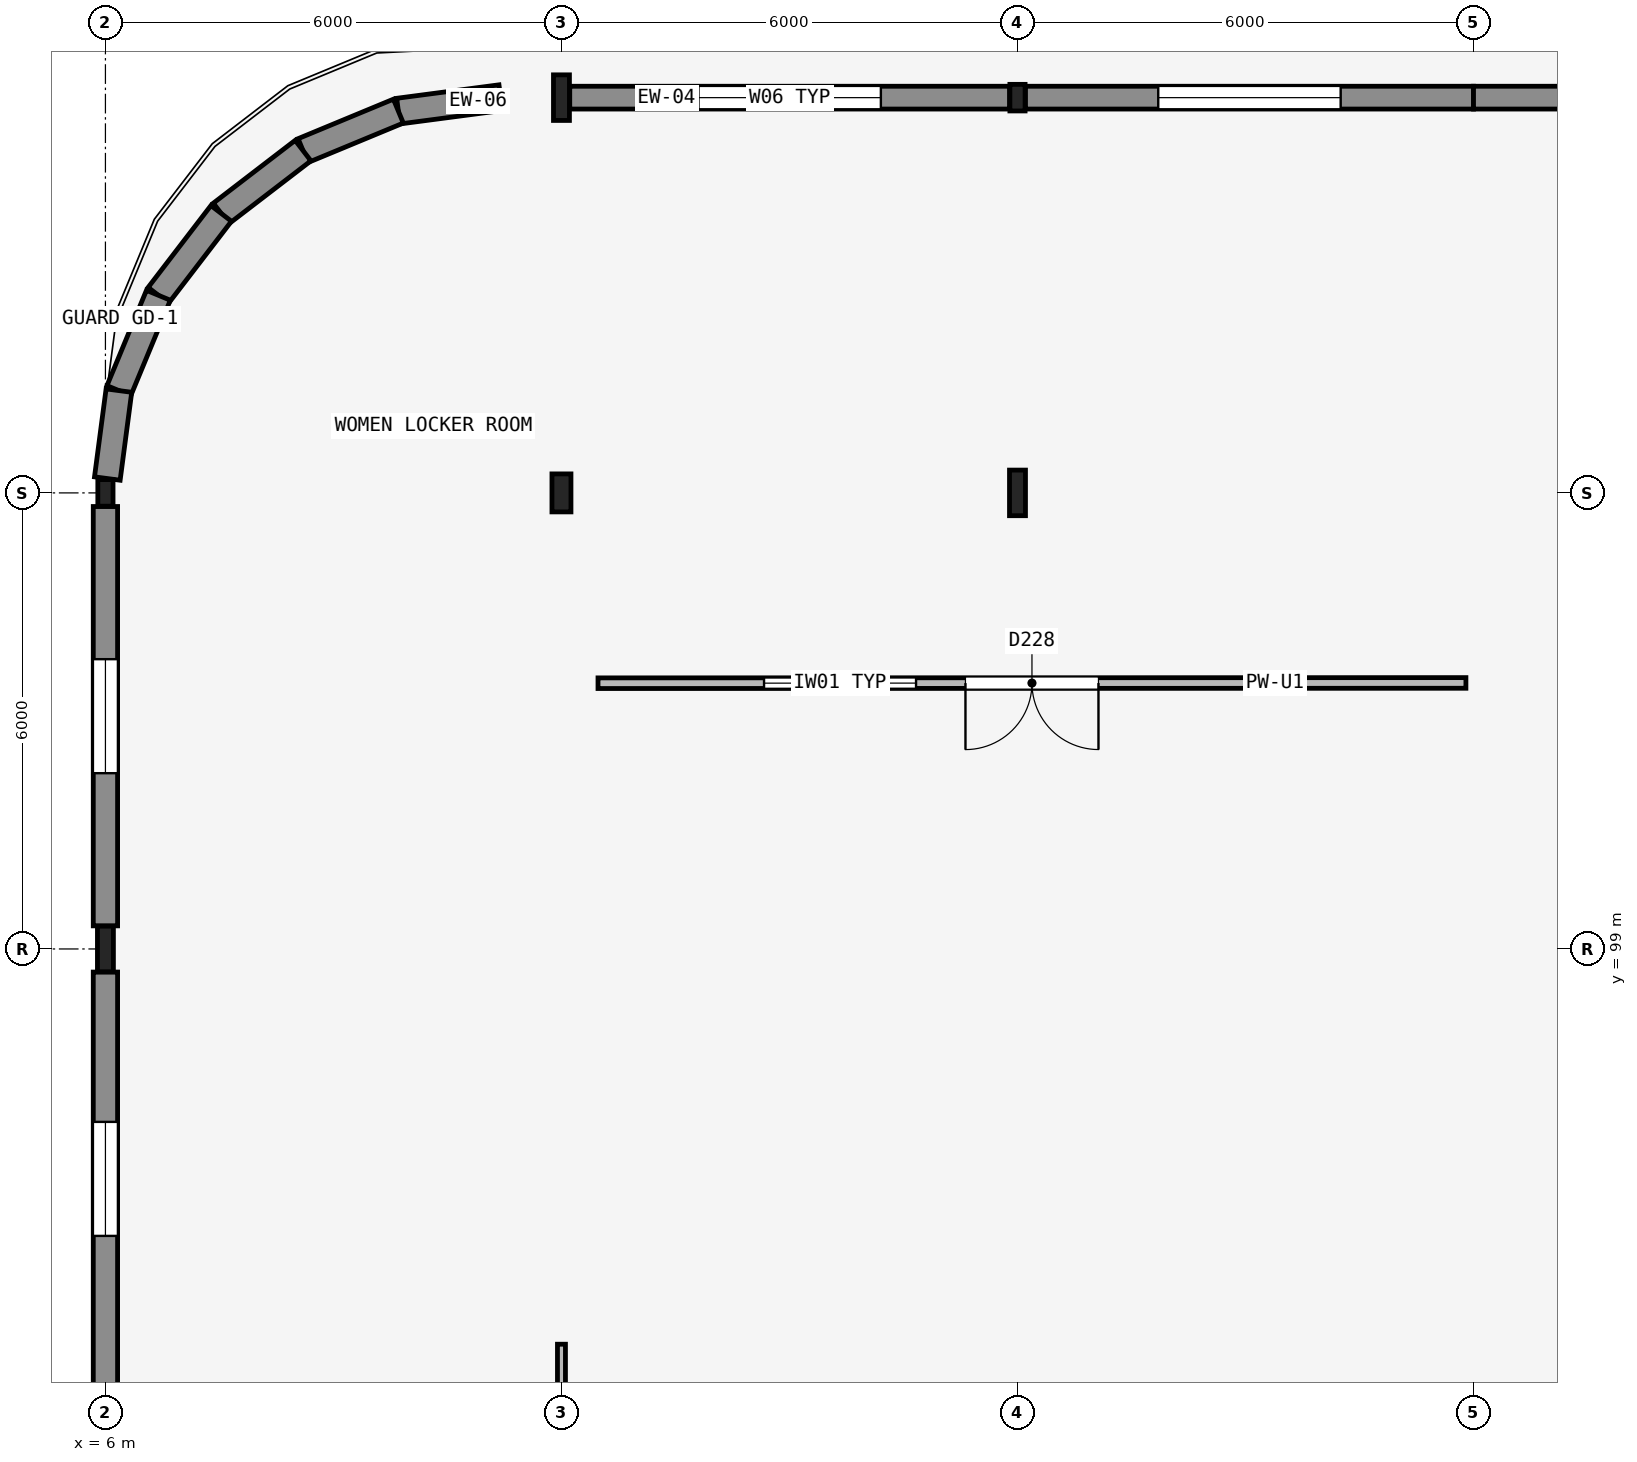
"""IFC4 building model, lengths in metres.
Left out: names, types, materials, properties, quantities, classifications, styles, units other than length and angle.
Written with IfcOpenShell. Run it as: python <this file> out.ifc"""

import sys

from ifc_helpers import new_model, si_unit, direction, frame, frame_2d, origin, origin_2d, place, context, subcontext, project, spatial, rectangle, hollow_rectangle, i_section, extrude, element, fill, save


model = new_model("IFC4")
c1 = context("Model", 3, precision=1e-05, world=origin(), true_north=direction((0.0, 1.0)))
c2 = subcontext(c1, "Body", "Model", "MODEL_VIEW")
j1 = project(units=[si_unit("LENGTHUNIT", "METRE"), si_unit("PLANEANGLEUNIT", "RADIAN")], contexts=[c1])
p1 = place(None, origin())
s1 = spatial("IfcSite", under=j1, at=p1, CompositionType="ELEMENT")
p2 = place(p1, origin())
s2 = spatial("IfcBuilding", under=s1, at=p2, CompositionType="ELEMENT")
p3 = place(p2, frame((0.0, 0.0, 9.3)))
s3 = spatial("IfcBuildingStorey", under=s2, at=p3, CompositionType="ELEMENT", Elevation=9.3)
p4 = place(p3, frame((6.0, 99.0, 0.0), z_axis=(0.0, 0.0, 1.0), x_axis=(1.0, 0.0, 0.0)))
e1 = element("IfcColumn", 1, at=p4, inside=s3, PredefinedType="COLUMN", context=c2, shape_type="SweptSolid", body=[
    extrude(i_section(OverallWidth=0.21, OverallDepth=0.6, WebThickness=0.012, FlangeThickness=0.021, FilletRadius=0.02, at=origin_2d()), origin(), (0.0, 0.0, 1.0), 4.2),
])
p5 = place(p3, frame((6.0, 105.0, 0.0), z_axis=(0.0, 0.0, 1.0), x_axis=(1.0, 0.0, 0.0)))
e2 = element("IfcColumn", 2, at=p5, inside=s3, PredefinedType="COLUMN", context=c2, shape_type="SweptSolid", body=[
    extrude(hollow_rectangle(XDim=0.2, YDim=0.35, WallThickness=0.012, InnerFilletRadius=0.012, OuterFilletRadius=0.024, at=origin_2d()), origin(), (0.0, 0.0, 1.0), 4.2),
])
p6 = place(p3, frame((12.0, 105.0, 0.0), z_axis=(0.0, 0.0, 1.0), x_axis=(1.0, 0.0, 0.0)))
e3 = element("IfcColumn", 3, at=p6, inside=s3, PredefinedType="COLUMN", context=c2, shape_type="SweptSolid", body=[
    extrude(i_section(OverallWidth=0.25, OverallDepth=0.5, WebThickness=0.01, FlangeThickness=0.015, FilletRadius=0.015, at=origin_2d()), origin(), (0.0, 0.0, 1.0), 4.2),
])
for number, where, z_axis, x_axis in (
    (4, (12.0, 110.2, 0.0), (0.0, 0.0, 1.0), (1.0, 0.0, 0.0)),
    (5, (18.0, 105.0, 0.0), (0.0, 0.0, 1.0), (1.0, 0.0, 0.0)),
):
    element("IfcColumn", number, at=place(p3, frame(where, z_axis=z_axis, x_axis=x_axis)), inside=s3, PredefinedType="COLUMN", context=c2, shape_type="SweptSolid", body=[
        extrude(i_section(OverallWidth=0.21, OverallDepth=0.6, WebThickness=0.012, FlangeThickness=0.021, FilletRadius=0.02, at=origin_2d()), origin(), (0.0, 0.0, 1.0), 4.2),
    ])
p7 = place(p3, frame((18.0, 110.2, 0.0), z_axis=(0.0, 0.0, 1.0), x_axis=(1.0, 0.0, 0.0)))
e6 = element("IfcColumn", 6, at=p7, inside=s3, PredefinedType="COLUMN", context=c2, shape_type="SweptSolid", body=[
    extrude(hollow_rectangle(XDim=0.2, YDim=0.35, WallThickness=0.012, InnerFilletRadius=0.012, OuterFilletRadius=0.024, at=origin_2d()), origin(), (0.0, 0.0, 1.0), 4.2),
])
p8 = place(p3, frame((6.0, 93.254, 0.0), z_axis=(0.0, 0.0, 1.0), x_axis=(0.0, 1.0, 0.0)))
e7 = element("IfcWall", 7, at=p8, inside=s3, PredefinedType="SOLIDWALL", context=c2, shape_type="SweptSolid", body=[
    extrude(rectangle(XDim=5.442, YDim=0.32, at=frame_2d((2.721, 0.0))), origin(), (0.0, 0.0, 1.0), 3.484),
])
p9 = place(p8, frame((1.971, 0.0, 1.6)))
e8 = element("IfcOpeningElement", 8, at=p9, cuts=e7, PredefinedType="OPENING", context=c2, shape_type="SweptSolid", body=[
    extrude(rectangle(XDim=1.5, YDim=0.6, at=frame_2d((0.75, 0.3))), frame((0.0, 0.17, 0.0), z_axis=(0.0, -1.0, 0.0), x_axis=(1.0, 0.0, 0.0)), (0.0, 0.0, 1.0), 0.34),
])
p10 = place(p3, frame((6.0, 99.304, 0.0), z_axis=(0.0, 0.0, 1.0), x_axis=(0.0, 1.0, 0.0)))
e9 = element("IfcWall", 9, at=p10, inside=s3, PredefinedType="SOLIDWALL", context=c2, shape_type="SweptSolid", body=[
    extrude(rectangle(XDim=5.517, YDim=0.32, at=frame_2d((2.759, 0.0))), origin(), (0.0, 0.0, 1.0), 3.44),
])
p11 = place(p10, frame((2.009, 0.0, 1.6)))
e10 = element("IfcOpeningElement", 10, at=p11, cuts=e9, PredefinedType="OPENING", context=c2, shape_type="SweptSolid", body=[
    extrude(rectangle(XDim=1.5, YDim=0.6, at=frame_2d((0.75, 0.3))), frame((0.0, 0.17, 0.0), z_axis=(0.0, -1.0, 0.0), x_axis=(1.0, 0.0, 0.0)), (0.0, 0.0, 1.0), 0.34),
])
p12 = place(p3, frame((12.109, 110.2, 0.0), z_axis=(0.0, 0.0, 1.0), x_axis=(1.0, 0.0, 0.0)))
e11 = element("IfcWall", 11, at=p12, inside=s3, PredefinedType="SOLIDWALL", context=c2, shape_type="SweptSolid", body=[
    extrude(rectangle(XDim=5.787, YDim=0.3, at=frame_2d((2.894, 0.0))), origin(), (0.0, 0.0, 1.0), 3.09),
])
p13 = place(p12, frame((1.694, 0.0, 1.1)))
e12 = element("IfcOpeningElement", 12, at=p13, cuts=e11, PredefinedType="OPENING", context=c2, shape_type="SweptSolid", body=[
    extrude(rectangle(XDim=2.4, YDim=1.2, at=frame_2d((1.2, 0.6))), frame((0.0, 0.16, 0.0), z_axis=(0.0, -1.0, 0.0), x_axis=(1.0, 0.0, 0.0)), (0.0, 0.0, 1.0), 0.32),
])
p14 = place(p3, frame((18.104, 110.2, 0.0), z_axis=(0.0, 0.0, 1.0), x_axis=(1.0, 0.0, 0.0)))
e13 = element("IfcWall", 13, at=p14, inside=s3, PredefinedType="SOLIDWALL", context=c2, shape_type="SweptSolid", body=[
    extrude(rectangle(XDim=5.896, YDim=0.3, at=frame_2d((2.948, 0.0))), origin(), (0.0, 0.0, 1.0), 3.09),
])
p15 = place(p14, frame((1.748, 0.0, 1.1)))
e14 = element("IfcOpeningElement", 14, at=p15, cuts=e13, PredefinedType="OPENING", context=c2, shape_type="SweptSolid", body=[
    extrude(rectangle(XDim=2.4, YDim=1.2, at=frame_2d((1.2, 0.6))), frame((0.0, 0.16, 0.0), z_axis=(0.0, -1.0, 0.0), x_axis=(1.0, 0.0, 0.0)), (0.0, 0.0, 1.0), 0.32),
])
p16 = place(p3, frame((24.0, 110.2, 0.0), z_axis=(0.0, 0.0, 1.0), x_axis=(1.0, 0.0, 0.0)))
e15 = element("IfcWall", 15, at=p16, inside=s3, PredefinedType="SOLIDWALL", context=c2, shape_type="SweptSolid", body=[
    extrude(rectangle(XDim=5.891, YDim=0.3, at=frame_2d((2.946, 0.0))), origin(), (0.0, 0.0, 1.0), 3.09),
])
p17 = place(p16, frame((1.746, 0.0, 1.1)))
e16 = element("IfcOpeningElement", 16, at=p17, cuts=e15, PredefinedType="OPENING", context=c2, shape_type="SweptSolid", body=[
    extrude(rectangle(XDim=2.4, YDim=1.2, at=frame_2d((1.2, 0.6))), frame((0.0, 0.16, 0.0), z_axis=(0.0, -1.0, 0.0), x_axis=(1.0, 0.0, 0.0)), (0.0, 0.0, 1.0), 0.32),
])
p18 = place(p3, frame((11.2, 110.2, 0.0), z_axis=(0.0, 0.0, 1.0), x_axis=(-0.991440211328, -0.130561507967, 0.0)))
e17 = element("IfcWall", 17, at=p18, inside=s3, PredefinedType="SOLIDWALL", context=c2, shape_type="SweptSolid", body=[
    extrude(rectangle(XDim=1.358, YDim=0.34, at=frame_2d((0.679, 0.0))), origin(), (0.0, 0.0, 1.0), 3.895),
])
p19 = place(p3, frame((9.854, 110.023, 0.0), z_axis=(0.0, 0.0, 1.0), x_axis=(-0.923905024937, -0.382621882407, 0.0)))
e18 = element("IfcWall", 18, at=p19, inside=s3, PredefinedType="SOLIDWALL", context=c2, shape_type="SweptSolid", body=[
    extrude(rectangle(XDim=1.357, YDim=0.34, at=frame_2d((0.679, 0.0))), origin(), (0.0, 0.0, 1.0), 3.895),
])
p20 = place(p3, frame((8.6, 109.503, 0.0), z_axis=(0.0, 0.0, 1.0), x_axis=(-0.793392131727, -0.60871087169, 0.0)))
e19 = element("IfcWall", 19, at=p20, inside=s3, PredefinedType="SOLIDWALL", context=c2, shape_type="SweptSolid", body=[
    extrude(rectangle(XDim=1.358, YDim=0.34, at=frame_2d((0.679, 0.0))), origin(), (0.0, 0.0, 1.0), 3.895),
])
for number, where, z_axis, x_axis in (
    (20, (7.523, 108.677, 0.0), (0.0, 0.0, 1.0), (-0.609, -0.793, 0.0)),
    (21, (6.697, 107.6, 0.0), (0.0, 0.0, 1.0), (-0.383, -0.924, 0.0)),
):
    element("IfcWall", number, at=place(p3, frame(where, z_axis=z_axis, x_axis=x_axis)), inside=s3, PredefinedType="SOLIDWALL", context=c2, shape_type="SweptSolid", body=[
        extrude(rectangle(XDim=1.357, YDim=0.34, at=frame_2d((0.679, 0.0))), origin(), (0.0, 0.0, 1.0), 3.895),
    ])
p21 = place(p3, frame((6.177, 106.346, 0.0), z_axis=(0.0, 0.0, 1.0), x_axis=(-0.130546512768, -0.991442185911, 0.0)))
e22 = element("IfcWall", 22, at=p21, inside=s3, PredefinedType="SOLIDWALL", context=c2, shape_type="SweptSolid", body=[
    extrude(rectangle(XDim=1.167, YDim=0.34, at=frame_2d((0.583, 0.0))), origin(), (0.0, 0.0, 1.0), 3.44),
])
p22 = place(p3, frame((12.0, 93.8, 0.0), z_axis=(0.0, 0.0, 1.0), x_axis=(0.0, -1.0, 0.0)))
e23 = element("IfcWall", 23, at=p22, inside=s3, PredefinedType="PARTITIONING", context=c2, shape_type="SweptSolid", body=[
    extrude(rectangle(XDim=18.3, YDim=0.105, at=frame_2d((9.15, 0.0))), origin(), (0.0, 0.0, 1.0), 2.69),
])
p23 = place(p22, frame((8.275, 0.0, 0.0)))
e24 = element("IfcOpeningElement", 24, at=p23, cuts=e23, PredefinedType="OPENING", context=c2, shape_type="SweptSolid", body=[
    extrude(rectangle(XDim=1.75, YDim=2.25, at=frame_2d((0.875, 1.125))), frame((0.0, 0.062, 0.0), z_axis=(0.0, -1.0, 0.0), x_axis=(1.0, 0.0, 0.0)), (0.0, 0.0, 1.0), 0.125),
])
p24 = place(p22, frame((10.675, 0.0, 0.9)))
e25 = element("IfcOpeningElement", 25, at=p24, cuts=e23, PredefinedType="OPENING", context=c2, shape_type="SweptSolid", body=[
    extrude(rectangle(XDim=2.8, YDim=1.5, at=frame_2d((1.4, 0.75))), frame((0.0, 0.062, 0.0), z_axis=(0.0, -1.0, 0.0), x_axis=(1.0, 0.0, 0.0)), (0.0, 0.0, 1.0), 0.125),
])
p25 = place(p3, frame((23.9, 102.5, 0.0), z_axis=(0.0, 0.0, 1.0), x_axis=(-0.999999948574, -0.000320704679, 0.0)))
e26 = element("IfcWall", 26, at=p25, inside=s3, PredefinedType="PARTITIONING", context=c2, shape_type="SweptSolid", body=[
    extrude(rectangle(XDim=11.419, YDim=0.14, at=frame_2d((5.709, 0.0))), origin(), (0.0, 0.0, 1.0), 2.69),
])
p26 = place(p25, frame((4.835, 0.0, 0.0)))
e27 = element("IfcOpeningElement", 27, at=p26, cuts=e26, PredefinedType="OPENING", context=c2, shape_type="SweptSolid", body=[
    extrude(rectangle(XDim=1.75, YDim=2.25, at=frame_2d((0.875, 1.125))), frame((0.0, 0.08, 0.0), z_axis=(0.0, -1.0, 0.0), x_axis=(1.0, 0.0, 0.0)), (0.0, 0.0, 1.0), 0.16),
])
p27 = place(p25, frame((7.235, 0.0, 1.0)))
e28 = element("IfcOpeningElement", 28, at=p27, cuts=e26, PredefinedType="OPENING", context=c2, shape_type="SweptSolid", body=[
    extrude(rectangle(XDim=2.0, YDim=1.2, at=frame_2d((1.0, 0.6))), frame((0.0, 0.08, 0.0), z_axis=(0.0, -1.0, 0.0), x_axis=(1.0, 0.0, 0.0)), (0.0, 0.0, 1.0), 0.16),
])
p28 = place(p9, origin())
e29 = element("IfcWindow", 29, at=p28, inside=s3, PartitioningType="SINGLE_PANEL", PredefinedType="WINDOW", context=c2, shape_type="SweptSolid", body=[
    extrude(rectangle(XDim=1.5, YDim=0.6, at=frame_2d((0.75, 0.3))), frame((0.0, 0.03, 0.0), z_axis=(0.0, -1.0, 0.0), x_axis=(1.0, 0.0, 0.0)), (0.0, 0.0, 1.0), 0.06),
])
fill(e8, e29)
p29 = place(p11, origin())
e30 = element("IfcWindow", 30, at=p29, inside=s3, PartitioningType="SINGLE_PANEL", PredefinedType="WINDOW", context=c2, shape_type="SweptSolid", body=[
    extrude(rectangle(XDim=1.5, YDim=0.6, at=frame_2d((0.75, 0.3))), frame((0.0, 0.03, 0.0), z_axis=(0.0, -1.0, 0.0), x_axis=(1.0, 0.0, 0.0)), (0.0, 0.0, 1.0), 0.06),
])
fill(e10, e30)
p30 = place(p13, origin())
e31 = element("IfcWindow", 31, at=p30, inside=s3, PartitioningType="SINGLE_PANEL", PredefinedType="WINDOW", context=c2, shape_type="SweptSolid", body=[
    extrude(rectangle(XDim=2.4, YDim=1.2, at=frame_2d((1.2, 0.6))), frame((0.0, 0.03, 0.0), z_axis=(0.0, -1.0, 0.0), x_axis=(1.0, 0.0, 0.0)), (0.0, 0.0, 1.0), 0.06),
])
fill(e12, e31)
p31 = place(p15, origin())
e32 = element("IfcWindow", 32, at=p31, inside=s3, PartitioningType="SINGLE_PANEL", PredefinedType="WINDOW", context=c2, shape_type="SweptSolid", body=[
    extrude(rectangle(XDim=2.4, YDim=1.2, at=frame_2d((1.2, 0.6))), frame((0.0, 0.03, 0.0), z_axis=(0.0, -1.0, 0.0), x_axis=(1.0, 0.0, 0.0)), (0.0, 0.0, 1.0), 0.06),
])
fill(e14, e32)
p32 = place(p26, origin())
e33 = element("IfcDoor", 33, at=p32, inside=s3, OperationType="DOUBLE_DOOR_SINGLE_SWING", PredefinedType="DOOR", context=c2, shape_type="SweptSolid", body=[
    extrude(rectangle(XDim=1.75, YDim=2.25, at=frame_2d((0.875, 1.125))), frame((0.0, 0.025, 0.0), z_axis=(0.0, -1.0, 0.0), x_axis=(1.0, 0.0, 0.0)), (0.0, 0.0, 1.0), 0.05),
])
fill(e27, e33)
p33 = place(p27, origin())
e34 = element("IfcWindow", 34, at=p33, inside=s3, PartitioningType="SINGLE_PANEL", PredefinedType="WINDOW", context=c2, shape_type="SweptSolid", body=[
    extrude(rectangle(XDim=2.0, YDim=1.2, at=frame_2d((1.0, 0.6))), frame((0.0, 0.03, 0.0), z_axis=(0.0, -1.0, 0.0), x_axis=(1.0, 0.0, 0.0)), (0.0, 0.0, 1.0), 0.06),
])
fill(e28, e34)
save(model, sys.argv[1])
